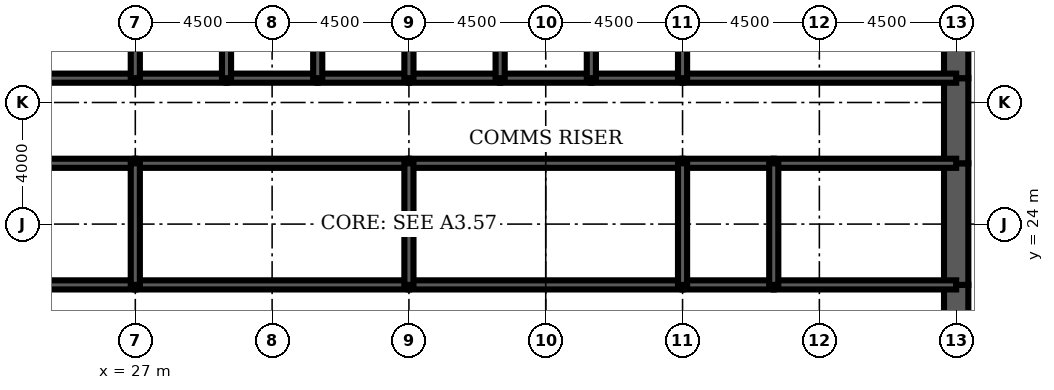
"""IFC4 building model, lengths in metres.
Left out: names, types, materials, properties, quantities, classifications, styles, units other than length and angle.
Written with IfcOpenShell. Run it as: python <this file> out.ifc"""

import sys

from ifc_helpers import new_model, si_unit, direction, frame, frame_2d, origin, place, context, subcontext, project, spatial, rectangle, extrude, element, fill, save


model = new_model("IFC4")
c1 = context("Model", 3, precision=1e-05, world=origin(), true_north=direction((0.0, 1.0)))
c2 = subcontext(c1, "Body", "Model", "MODEL_VIEW")
j1 = project(units=[si_unit("LENGTHUNIT", "METRE"), si_unit("PLANEANGLEUNIT", "RADIAN")], contexts=[c1])
p1 = place(None, origin())
s1 = spatial("IfcSite", under=j1, at=p1, CompositionType="ELEMENT")
p2 = place(p1, origin())
s2 = spatial("IfcBuilding", under=s1, at=p2, CompositionType="ELEMENT")
p3 = place(p2, frame((0.0, 0.0, 244.6)))
s3 = spatial("IfcBuildingStorey", under=s2, at=p3, CompositionType="ELEMENT", Elevation=244.6)
p4 = place(p3, frame((54.0, 19.2, 0.0), z_axis=(0.0, 0.0, 1.0), x_axis=(0.0, 1.0, 0.0)))
e1 = element("IfcWall", 1, at=p4, inside=s3, PredefinedType="SHEAR", context=c2, shape_type="SweptSolid", body=[
    extrude(rectangle(XDim=2.8, YDim=0.8, at=frame_2d((1.4, 0.0))), origin(), (0.0, 0.0, 1.0), 4.2),
])
p5 = place(p4, frame((0.4, 0.0, 0.0)))
e2 = element("IfcOpeningElement", 2, at=p5, cuts=e1, PredefinedType="OPENING", context=c2, shape_type="SweptSolid", body=[
    extrude(rectangle(XDim=1.8, YDim=2.1, at=frame_2d((0.9, 1.05))), frame((0.0, 0.41, 0.0), z_axis=(0.0, -1.0, 0.0), x_axis=(1.0, 0.0, 0.0)), (0.0, 0.0, 1.0), 0.82),
])
p6 = place(p3, frame((54.0, 22.0, 0.0), z_axis=(0.0, 0.0, 1.0), x_axis=(0.0, 1.0, 0.0)))
e3 = element("IfcWall", 3, at=p6, inside=s3, PredefinedType="SHEAR", context=c2, shape_type="SweptSolid", body=[
    extrude(rectangle(XDim=4.0, YDim=0.8, at=frame_2d((2.0, 0.0))), origin(), (0.0, 0.0, 1.0), 4.2),
])
p7 = place(p3, frame((54.0, 26.0, 0.0), z_axis=(0.0, 0.0, 1.0), x_axis=(0.0, 1.0, 0.0)))
e4 = element("IfcWall", 4, at=p7, inside=s3, PredefinedType="SHEAR", context=c2, shape_type="SweptSolid", body=[
    extrude(rectangle(XDim=2.8, YDim=0.8, at=frame_2d((1.4, 0.0))), origin(), (0.0, 0.0, 1.0), 4.2),
])
p8 = place(p7, frame((0.6, 0.0, 0.0)))
e5 = element("IfcOpeningElement", 5, at=p8, cuts=e4, PredefinedType="OPENING", context=c2, shape_type="SweptSolid", body=[
    extrude(rectangle(XDim=1.8, YDim=2.1, at=frame_2d((0.9, 1.05))), frame((0.0, 0.41, 0.0), z_axis=(0.0, -1.0, 0.0), x_axis=(1.0, 0.0, 0.0)), (0.0, 0.0, 1.0), 0.82),
])
p9 = place(p3, frame((54.0, 28.8, 0.0), z_axis=(0.0, 0.0, 1.0), x_axis=(0.0, 1.0, 0.0)))
e6 = element("IfcWall", 6, at=p9, inside=s3, PredefinedType="SHEAR", context=c2, shape_type="SweptSolid", body=[
    extrude(rectangle(XDim=3.2, YDim=0.8, at=frame_2d((1.6, 0.0))), origin(), (0.0, 0.0, 1.0), 4.2),
])
p10 = place(p3, frame((18.0, 28.8, 0.0), z_axis=(0.0, 0.0, 1.0), x_axis=(1.0, 0.0, 0.0)))
e7 = element("IfcWall", 7, at=p10, inside=s3, PredefinedType="SOLIDWALL", context=c2, shape_type="SweptSolid", body=[
    extrude(rectangle(XDim=9.0, YDim=0.3, at=frame_2d((4.5, 0.0))), origin(), (0.0, 0.0, 1.0), 4.2),
])
p11 = place(p10, frame((0.65, 0.0, 0.0)))
e8 = element("IfcOpeningElement", 8, at=p11, cuts=e7, PredefinedType="OPENING", context=c2, shape_type="SweptSolid", body=[
    extrude(rectangle(XDim=1.0, YDim=2.1, at=frame_2d((0.5, 1.05))), frame((0.0, 0.16, 0.0), z_axis=(0.0, -1.0, 0.0), x_axis=(1.0, 0.0, 0.0)), (0.0, 0.0, 1.0), 0.32),
])
p12 = place(p3, frame((27.0, 28.8, 0.0), z_axis=(0.0, 0.0, 1.0), x_axis=(1.0, 0.0, 0.0)))
e9 = element("IfcWall", 9, at=p12, inside=s3, PredefinedType="SOLIDWALL", context=c2, shape_type="SweptSolid", body=[
    extrude(rectangle(XDim=3.0, YDim=0.3, at=frame_2d((1.5, 0.0))), origin(), (0.0, 0.0, 1.0), 4.2),
])
p13 = place(p12, frame((0.95, 0.0, 0.0)))
e10 = element("IfcOpeningElement", 10, at=p13, cuts=e9, PredefinedType="OPENING", context=c2, shape_type="SweptSolid", body=[
    extrude(rectangle(XDim=1.1, YDim=2.2, at=frame_2d((0.55, 1.1))), frame((0.0, 0.16, 0.0), z_axis=(0.0, -1.0, 0.0), x_axis=(1.0, 0.0, 0.0)), (0.0, 0.0, 1.0), 0.32),
])
p14 = place(p3, frame((30.0, 28.8, 0.0), z_axis=(0.0, 0.0, 1.0), x_axis=(1.0, 0.0, 0.0)))
e11 = element("IfcWall", 11, at=p14, inside=s3, PredefinedType="SOLIDWALL", context=c2, shape_type="SweptSolid", body=[
    extrude(rectangle(XDim=3.0, YDim=0.3, at=frame_2d((1.5, 0.0))), origin(), (0.0, 0.0, 1.0), 4.2),
])
p15 = place(p14, frame((0.95, 0.0, 0.0)))
e12 = element("IfcOpeningElement", 12, at=p15, cuts=e11, PredefinedType="OPENING", context=c2, shape_type="SweptSolid", body=[
    extrude(rectangle(XDim=1.1, YDim=2.2, at=frame_2d((0.55, 1.1))), frame((0.0, 0.16, 0.0), z_axis=(0.0, -1.0, 0.0), x_axis=(1.0, 0.0, 0.0)), (0.0, 0.0, 1.0), 0.32),
])
p16 = place(p3, frame((33.0, 28.8, 0.0), z_axis=(0.0, 0.0, 1.0), x_axis=(1.0, 0.0, 0.0)))
e13 = element("IfcWall", 13, at=p16, inside=s3, PredefinedType="SOLIDWALL", context=c2, shape_type="SweptSolid", body=[
    extrude(rectangle(XDim=3.0, YDim=0.3, at=frame_2d((1.5, 0.0))), origin(), (0.0, 0.0, 1.0), 4.2),
])
p17 = place(p16, frame((0.95, 0.0, 0.0)))
e14 = element("IfcOpeningElement", 14, at=p17, cuts=e13, PredefinedType="OPENING", context=c2, shape_type="SweptSolid", body=[
    extrude(rectangle(XDim=1.1, YDim=2.2, at=frame_2d((0.55, 1.1))), frame((0.0, 0.16, 0.0), z_axis=(0.0, -1.0, 0.0), x_axis=(1.0, 0.0, 0.0)), (0.0, 0.0, 1.0), 0.32),
])
for number, where, z_axis, x_axis in (
    (15, (36.0, 28.8, 0.0), (0.0, 0.0, 1.0), (1.0, 0.0, 0.0)),
    (16, (39.0, 28.8, 0.0), (0.0, 0.0, 1.0), (1.0, 0.0, 0.0)),
):
    element("IfcWall", number, at=place(p3, frame(where, z_axis=z_axis, x_axis=x_axis)), inside=s3, PredefinedType="SOLIDWALL", context=c2, shape_type="SweptSolid", body=[
        extrude(rectangle(XDim=3.0, YDim=0.3, at=frame_2d((1.5, 0.0))), origin(), (0.0, 0.0, 1.0), 4.2),
    ])
p18 = place(p3, frame((42.0, 28.8, 0.0), z_axis=(0.0, 0.0, 1.0), x_axis=(1.0, 0.0, 0.0)))
e17 = element("IfcWall", 17, at=p18, inside=s3, PredefinedType="SOLIDWALL", context=c2, shape_type="SweptSolid", body=[
    extrude(rectangle(XDim=3.0, YDim=0.3, at=frame_2d((1.5, 0.0))), origin(), (0.0, 0.0, 1.0), 4.2),
])
p19 = place(p18, frame((0.95, 0.0, 0.0)))
e18 = element("IfcOpeningElement", 18, at=p19, cuts=e17, PredefinedType="OPENING", context=c2, shape_type="SweptSolid", body=[
    extrude(rectangle(XDim=1.1, YDim=2.2, at=frame_2d((0.55, 1.1))), frame((0.0, 0.16, 0.0), z_axis=(0.0, -1.0, 0.0), x_axis=(1.0, 0.0, 0.0)), (0.0, 0.0, 1.0), 0.32),
])
p20 = place(p3, frame((45.0, 28.8, 0.0), z_axis=(0.0, 0.0, 1.0), x_axis=(1.0, 0.0, 0.0)))
e19 = element("IfcWall", 19, at=p20, inside=s3, PredefinedType="SOLIDWALL", context=c2, shape_type="SweptSolid", body=[
    extrude(rectangle(XDim=9.0, YDim=0.3, at=frame_2d((4.5, 0.0))), origin(), (0.0, 0.0, 1.0), 4.2),
])
p21 = place(p20, frame((7.35, 0.0, 0.0)))
e20 = element("IfcOpeningElement", 20, at=p21, cuts=e19, PredefinedType="OPENING", context=c2, shape_type="SweptSolid", body=[
    extrude(rectangle(XDim=1.0, YDim=2.1, at=frame_2d((0.5, 1.05))), frame((0.0, 0.16, 0.0), z_axis=(0.0, -1.0, 0.0), x_axis=(1.0, 0.0, 0.0)), (0.0, 0.0, 1.0), 0.32),
])
p22 = place(p3, frame((24.0, 22.0, 0.0), z_axis=(0.0, 0.0, 1.0), x_axis=(1.0, 0.0, 0.0)))
e21 = element("IfcWall", 21, at=p22, inside=s3, PredefinedType="SOLIDWALL", context=c2, shape_type="SweptSolid", body=[
    extrude(rectangle(XDim=3.0, YDim=0.3, at=frame_2d((1.5, 0.0))), origin(), (0.0, 0.0, 1.0), 4.2),
])
p23 = place(p22, frame((1.0, 0.0, 0.0)))
e22 = element("IfcOpeningElement", 22, at=p23, cuts=e21, PredefinedType="OPENING", context=c2, shape_type="SweptSolid", body=[
    extrude(rectangle(XDim=1.0, YDim=2.1, at=frame_2d((0.5, 1.05))), frame((0.0, 0.16, 0.0), z_axis=(0.0, -1.0, 0.0), x_axis=(1.0, 0.0, 0.0)), (0.0, 0.0, 1.0), 0.32),
])
p24 = place(p3, frame((27.0, 22.0, 0.0), z_axis=(0.0, 0.0, 1.0), x_axis=(1.0, 0.0, 0.0)))
e23 = element("IfcWall", 23, at=p24, inside=s3, PredefinedType="SOLIDWALL", context=c2, shape_type="SweptSolid", body=[
    extrude(rectangle(XDim=9.0, YDim=0.3, at=frame_2d((4.5, 0.0))), origin(), (0.0, 0.0, 1.0), 4.2),
])
p25 = place(p24, frame((4.0, 0.0, 0.0)))
e24 = element("IfcOpeningElement", 24, at=p25, cuts=e23, PredefinedType="OPENING", context=c2, shape_type="SweptSolid", body=[
    extrude(rectangle(XDim=1.0, YDim=2.1, at=frame_2d((0.5, 1.05))), frame((0.0, 0.16, 0.0), z_axis=(0.0, -1.0, 0.0), x_axis=(1.0, 0.0, 0.0)), (0.0, 0.0, 1.0), 0.32),
])
p26 = place(p3, frame((36.0, 22.0, 0.0), z_axis=(0.0, 0.0, 1.0), x_axis=(1.0, 0.0, 0.0)))
e25 = element("IfcWall", 25, at=p26, inside=s3, PredefinedType="SOLIDWALL", context=c2, shape_type="SweptSolid", body=[
    extrude(rectangle(XDim=9.0, YDim=0.3, at=frame_2d((4.5, 0.0))), origin(), (0.0, 0.0, 1.0), 4.2),
])
p27 = place(p26, frame((4.0, 0.0, 0.0)))
e26 = element("IfcOpeningElement", 26, at=p27, cuts=e25, PredefinedType="OPENING", context=c2, shape_type="SweptSolid", body=[
    extrude(rectangle(XDim=1.0, YDim=2.1, at=frame_2d((0.5, 1.05))), frame((0.0, 0.16, 0.0), z_axis=(0.0, -1.0, 0.0), x_axis=(1.0, 0.0, 0.0)), (0.0, 0.0, 1.0), 0.32),
])
p28 = place(p3, frame((45.0, 22.0, 0.0), z_axis=(0.0, 0.0, 1.0), x_axis=(1.0, 0.0, 0.0)))
e27 = element("IfcWall", 27, at=p28, inside=s3, PredefinedType="SOLIDWALL", context=c2, shape_type="SweptSolid", body=[
    extrude(rectangle(XDim=3.0, YDim=0.3, at=frame_2d((1.5, 0.0))), origin(), (0.0, 0.0, 1.0), 4.2),
])
p29 = place(p28, frame((1.0, 0.0, 0.0)))
e28 = element("IfcOpeningElement", 28, at=p29, cuts=e27, PredefinedType="OPENING", context=c2, shape_type="SweptSolid", body=[
    extrude(rectangle(XDim=1.0, YDim=2.1, at=frame_2d((0.5, 1.05))), frame((0.0, 0.16, 0.0), z_axis=(0.0, -1.0, 0.0), x_axis=(1.0, 0.0, 0.0)), (0.0, 0.0, 1.0), 0.32),
])
p30 = place(p3, frame((48.0, 22.0, 0.0), z_axis=(0.0, 0.0, 1.0), x_axis=(1.0, 0.0, 0.0)))
e29 = element("IfcWall", 29, at=p30, inside=s3, PredefinedType="SOLIDWALL", context=c2, shape_type="SweptSolid", body=[
    extrude(rectangle(XDim=6.0, YDim=0.3, at=frame_2d((3.0, 0.0))), origin(), (0.0, 0.0, 1.0), 4.2),
])
p31 = place(p30, frame((2.0, 0.0, 0.0)))
e30 = element("IfcOpeningElement", 30, at=p31, cuts=e29, PredefinedType="OPENING", context=c2, shape_type="SweptSolid", body=[
    extrude(rectangle(XDim=1.0, YDim=2.1, at=frame_2d((0.5, 1.05))), frame((0.0, 0.16, 0.0), z_axis=(0.0, -1.0, 0.0), x_axis=(1.0, 0.0, 0.0)), (0.0, 0.0, 1.0), 0.32),
])
p32 = place(p30, frame((4.35, 0.0, 0.0)))
e31 = element("IfcOpeningElement", 31, at=p32, cuts=e29, PredefinedType="OPENING", context=c2, shape_type="SweptSolid", body=[
    extrude(rectangle(XDim=1.0, YDim=2.1, at=frame_2d((0.5, 1.05))), frame((0.0, 0.16, 0.0), z_axis=(0.0, -1.0, 0.0), x_axis=(1.0, 0.0, 0.0)), (0.0, 0.0, 1.0), 0.32),
])
p33 = place(p3, frame((24.0, 26.0, 0.0), z_axis=(0.0, 0.0, 1.0), x_axis=(1.0, 0.0, 0.0)))
e32 = element("IfcWall", 32, at=p33, inside=s3, PredefinedType="SOLIDWALL", context=c2, shape_type="SweptSolid", body=[
    extrude(rectangle(XDim=3.0, YDim=0.3, at=frame_2d((1.5, 0.0))), origin(), (0.0, 0.0, 1.0), 4.2),
])
for number, where, z_axis, x_axis in (
    (33, (27.0, 26.0, 0.0), (0.0, 0.0, 1.0), (1.0, 0.0, 0.0)),
    (34, (36.0, 26.0, 0.0), (0.0, 0.0, 1.0), (1.0, 0.0, 0.0)),
):
    element("IfcWall", number, at=place(p3, frame(where, z_axis=z_axis, x_axis=x_axis)), inside=s3, PredefinedType="SOLIDWALL", context=c2, shape_type="SweptSolid", body=[
        extrude(rectangle(XDim=9.0, YDim=0.3, at=frame_2d((4.5, 0.0))), origin(), (0.0, 0.0, 1.0), 4.2),
    ])
p34 = place(p3, frame((45.0, 26.0, 0.0), z_axis=(0.0, 0.0, 1.0), x_axis=(1.0, 0.0, 0.0)))
e35 = element("IfcWall", 35, at=p34, inside=s3, PredefinedType="SOLIDWALL", context=c2, shape_type="SweptSolid", body=[
    extrude(rectangle(XDim=3.0, YDim=0.3, at=frame_2d((1.5, 0.0))), origin(), (0.0, 0.0, 1.0), 4.2),
])
p35 = place(p3, frame((48.0, 26.0, 0.0), z_axis=(0.0, 0.0, 1.0), x_axis=(1.0, 0.0, 0.0)))
e36 = element("IfcWall", 36, at=p35, inside=s3, PredefinedType="SOLIDWALL", context=c2, shape_type="SweptSolid", body=[
    extrude(rectangle(XDim=6.0, YDim=0.3, at=frame_2d((3.0, 0.0))), origin(), (0.0, 0.0, 1.0), 4.2),
])
for number, where, z_axis, x_axis in (
    (37, (27.0, 28.8, 0.0), (0.0, 0.0, 1.0), (0.0, 1.0, 0.0)),
    (38, (30.0, 28.8, 0.0), (0.0, 0.0, 1.0), (0.0, 1.0, 0.0)),
    (39, (33.0, 28.8, 0.0), (0.0, 0.0, 1.0), (0.0, 1.0, 0.0)),
    (40, (36.0, 28.8, 0.0), (0.0, 0.0, 1.0), (0.0, 1.0, 0.0)),
    (41, (39.0, 28.8, 0.0), (0.0, 0.0, 1.0), (0.0, 1.0, 0.0)),
    (42, (42.0, 28.8, 0.0), (0.0, 0.0, 1.0), (0.0, 1.0, 0.0)),
    (43, (45.0, 28.8, 0.0), (0.0, 0.0, 1.0), (0.0, 1.0, 0.0)),
):
    element("IfcWall", number, at=place(p3, frame(where, z_axis=z_axis, x_axis=x_axis)), inside=s3, PredefinedType="SOLIDWALL", context=c2, shape_type="SweptSolid", body=[
        extrude(rectangle(XDim=3.2, YDim=0.3, at=frame_2d((1.6, 0.0))), origin(), (0.0, 0.0, 1.0), 4.2),
    ])
for number, where, z_axis, x_axis in (
    (44, (27.0, 22.0, 0.0), (0.0, 0.0, 1.0), (0.0, 1.0, 0.0)),
    (45, (36.0, 22.0, 0.0), (0.0, 0.0, 1.0), (0.0, 1.0, 0.0)),
    (46, (45.0, 22.0, 0.0), (0.0, 0.0, 1.0), (0.0, 1.0, 0.0)),
    (47, (48.0, 22.0, 0.0), (0.0, 0.0, 1.0), (0.0, 1.0, 0.0)),
):
    element("IfcWall", number, at=place(p3, frame(where, z_axis=z_axis, x_axis=x_axis)), inside=s3, PredefinedType="SOLIDWALL", context=c2, shape_type="SweptSolid", body=[
        extrude(rectangle(XDim=4.0, YDim=0.3, at=frame_2d((2.0, 0.0))), origin(), (0.0, 0.0, 1.0), 4.2),
    ])
p36 = place(p3, frame((38.5, 22.15, 0.0), z_axis=(0.0, 0.0, 1.0), x_axis=(0.0, 1.0, 0.0)))
e48 = element("IfcWall", 48, at=p36, inside=s3, PredefinedType="PARTITIONING", context=c2, shape_type="SweptSolid", body=[
    extrude(rectangle(XDim=3.7, YDim=0.15, at=frame_2d((1.85, 0.0))), origin(), (0.0, 0.0, 1.0), 3.0),
])
p37 = place(p36, frame((2.2, 0.0, 0.0)))
e49 = element("IfcOpeningElement", 49, at=p37, cuts=e48, PredefinedType="OPENING", context=c2, shape_type="SweptSolid", body=[
    extrude(rectangle(XDim=1.0, YDim=2.1, at=frame_2d((0.5, 1.05))), frame((0.0, 0.085, 0.0), z_axis=(0.0, -1.0, 0.0), x_axis=(1.0, 0.0, 0.0)), (0.0, 0.0, 1.0), 0.17),
])
p38 = place(p3, frame((52.025, 22.15, 0.0), z_axis=(0.0, 0.0, 1.0), x_axis=(0.0, 1.0, 0.0)))
e50 = element("IfcWall", 50, at=p38, inside=s3, PredefinedType="PARTITIONING", context=c2, shape_type="SweptSolid", body=[
    extrude(rectangle(XDim=3.7, YDim=0.15, at=frame_2d((1.85, 0.0))), origin(), (0.0, 0.0, 1.0), 3.0),
])
p39 = place(p3, frame((25.2, 26.15, 0.0), z_axis=(0.0, 0.0, 1.0), x_axis=(0.0, 1.0, 0.0)))
e51 = element("IfcWall", 51, at=p39, inside=s3, PredefinedType="PARTITIONING", context=c2, shape_type="SweptSolid", body=[
    extrude(rectangle(XDim=2.5, YDim=0.15, at=frame_2d((1.25, 0.0))), origin(), (0.0, 0.0, 1.0), 3.0),
])
p40 = place(p39, frame((0.35, 0.0, 0.0)))
e52 = element("IfcOpeningElement", 52, at=p40, cuts=e51, PredefinedType="OPENING", context=c2, shape_type="SweptSolid", body=[
    extrude(rectangle(XDim=1.0, YDim=2.1, at=frame_2d((0.5, 1.05))), frame((0.0, 0.085, 0.0), z_axis=(0.0, -1.0, 0.0), x_axis=(1.0, 0.0, 0.0)), (0.0, 0.0, 1.0), 0.17),
])
p41 = place(p37, origin())
e53 = element("IfcDoor", 53, at=p41, inside=s3, OperationType="SINGLE_SWING_RIGHT", PredefinedType="DOOR", context=c2, shape_type="SweptSolid", body=[
    extrude(rectangle(XDim=1.0, YDim=2.1, at=frame_2d((0.5, 1.05))), frame((0.0, 0.025, 0.0), z_axis=(0.0, -1.0, 0.0), x_axis=(1.0, 0.0, 0.0)), (0.0, 0.0, 1.0), 0.05),
])
fill(e49, e53)
p42 = place(p40, origin())
e54 = element("IfcDoor", 54, at=p42, inside=s3, OperationType="SINGLE_SWING_LEFT", PredefinedType="DOOR", context=c2, shape_type="SweptSolid", body=[
    extrude(rectangle(XDim=1.0, YDim=2.1, at=frame_2d((0.5, 1.05))), frame((0.0, 0.025, 0.0), z_axis=(0.0, -1.0, 0.0), x_axis=(1.0, 0.0, 0.0)), (0.0, 0.0, 1.0), 0.05),
])
fill(e52, e54)
p43 = place(p19, origin())
e55 = element("IfcDoor", 55, at=p43, inside=s3, OperationType="DOUBLE_DOOR_SLIDING", PredefinedType="USERDEFINED", context=c2, shape_type="SweptSolid", body=[
    extrude(rectangle(XDim=1.1, YDim=2.2, at=frame_2d((0.55, 1.1))), frame((0.0, 0.025, 0.0), z_axis=(0.0, -1.0, 0.0), x_axis=(1.0, 0.0, 0.0)), (0.0, 0.0, 1.0), 0.05),
])
fill(e18, e55)
p44 = place(p13, origin())
e56 = element("IfcDoor", 56, at=p44, inside=s3, OperationType="DOUBLE_DOOR_SLIDING", PredefinedType="USERDEFINED", context=c2, shape_type="SweptSolid", body=[
    extrude(rectangle(XDim=1.1, YDim=2.2, at=frame_2d((0.55, 1.1))), frame((0.0, 0.025, 0.0), z_axis=(0.0, -1.0, 0.0), x_axis=(1.0, 0.0, 0.0)), (0.0, 0.0, 1.0), 0.05),
])
fill(e10, e56)
p45 = place(p15, origin())
e57 = element("IfcDoor", 57, at=p45, inside=s3, OperationType="DOUBLE_DOOR_SLIDING", PredefinedType="USERDEFINED", context=c2, shape_type="SweptSolid", body=[
    extrude(rectangle(XDim=1.1, YDim=2.2, at=frame_2d((0.55, 1.1))), frame((0.0, 0.025, 0.0), z_axis=(0.0, -1.0, 0.0), x_axis=(1.0, 0.0, 0.0)), (0.0, 0.0, 1.0), 0.05),
])
fill(e12, e57)
p46 = place(p17, origin())
e58 = element("IfcDoor", 58, at=p46, inside=s3, OperationType="DOUBLE_DOOR_SLIDING", PredefinedType="USERDEFINED", context=c2, shape_type="SweptSolid", body=[
    extrude(rectangle(XDim=1.1, YDim=2.2, at=frame_2d((0.55, 1.1))), frame((0.0, 0.025, 0.0), z_axis=(0.0, -1.0, 0.0), x_axis=(1.0, 0.0, 0.0)), (0.0, 0.0, 1.0), 0.05),
])
fill(e14, e58)
p47 = place(p21, origin())
e59 = element("IfcDoor", 59, at=p47, inside=s3, OperationType="SINGLE_SWING_RIGHT", PredefinedType="DOOR", context=c2, shape_type="SweptSolid", body=[
    extrude(rectangle(XDim=1.0, YDim=2.1, at=frame_2d((0.5, 1.05))), frame((0.0, 0.025, 0.0), z_axis=(0.0, -1.0, 0.0), x_axis=(1.0, 0.0, 0.0)), (0.0, 0.0, 1.0), 0.05),
])
fill(e20, e59)
p48 = place(p5, origin())
e60 = element("IfcDoor", 60, at=p48, inside=s3, OperationType="SINGLE_SWING_LEFT", PredefinedType="DOOR", context=c2, shape_type="SweptSolid", body=[
    extrude(rectangle(XDim=1.8, YDim=2.1, at=frame_2d((0.9, 1.05))), frame((0.0, 0.4, 0.0), z_axis=(0.0, -1.0, 0.0), x_axis=(1.0, 0.0, 0.0)), (0.0, 0.0, 1.0), 0.8),
])
fill(e2, e60)
p49 = place(p8, origin())
e61 = element("IfcDoor", 61, at=p49, inside=s3, OperationType="SINGLE_SWING_LEFT", PredefinedType="DOOR", context=c2, shape_type="SweptSolid", body=[
    extrude(rectangle(XDim=1.8, YDim=2.1, at=frame_2d((0.9, 1.05))), frame((0.0, 0.4, 0.0), z_axis=(0.0, -1.0, 0.0), x_axis=(1.0, 0.0, 0.0)), (0.0, 0.0, 1.0), 0.8),
])
fill(e5, e61)
p50 = place(p23, origin())
e62 = element("IfcDoor", 62, at=p50, inside=s3, OperationType="SINGLE_SWING_LEFT", PredefinedType="DOOR", context=c2, shape_type="SweptSolid", body=[
    extrude(rectangle(XDim=1.0, YDim=2.1, at=frame_2d((0.5, 1.05))), frame((0.0, 0.025, 0.0), z_axis=(0.0, -1.0, 0.0), x_axis=(1.0, 0.0, 0.0)), (0.0, 0.0, 1.0), 0.05),
])
fill(e22, e62)
p51 = place(p25, origin())
e63 = element("IfcDoor", 63, at=p51, inside=s3, OperationType="SINGLE_SWING_LEFT", PredefinedType="DOOR", context=c2, shape_type="SweptSolid", body=[
    extrude(rectangle(XDim=1.0, YDim=2.1, at=frame_2d((0.5, 1.05))), frame((0.0, 0.025, 0.0), z_axis=(0.0, -1.0, 0.0), x_axis=(1.0, 0.0, 0.0)), (0.0, 0.0, 1.0), 0.05),
])
fill(e24, e63)
p52 = place(p27, origin())
e64 = element("IfcDoor", 64, at=p52, inside=s3, OperationType="SINGLE_SWING_LEFT", PredefinedType="DOOR", context=c2, shape_type="SweptSolid", body=[
    extrude(rectangle(XDim=1.0, YDim=2.1, at=frame_2d((0.5, 1.05))), frame((0.0, 0.025, 0.0), z_axis=(0.0, -1.0, 0.0), x_axis=(1.0, 0.0, 0.0)), (0.0, 0.0, 1.0), 0.05),
])
fill(e26, e64)
p53 = place(p29, origin())
e65 = element("IfcDoor", 65, at=p53, inside=s3, OperationType="SINGLE_SWING_LEFT", PredefinedType="DOOR", context=c2, shape_type="SweptSolid", body=[
    extrude(rectangle(XDim=1.0, YDim=2.1, at=frame_2d((0.5, 1.05))), frame((0.0, 0.025, 0.0), z_axis=(0.0, -1.0, 0.0), x_axis=(1.0, 0.0, 0.0)), (0.0, 0.0, 1.0), 0.05),
])
fill(e28, e65)
p54 = place(p31, origin())
e66 = element("IfcDoor", 66, at=p54, inside=s3, OperationType="SINGLE_SWING_LEFT", PredefinedType="DOOR", context=c2, shape_type="SweptSolid", body=[
    extrude(rectangle(XDim=1.0, YDim=2.1, at=frame_2d((0.5, 1.05))), frame((0.0, 0.025, 0.0), z_axis=(0.0, -1.0, 0.0), x_axis=(1.0, 0.0, 0.0)), (0.0, 0.0, 1.0), 0.05),
])
fill(e30, e66)
p55 = place(p32, origin())
e67 = element("IfcDoor", 67, at=p55, inside=s3, OperationType="SINGLE_SWING_RIGHT", PredefinedType="DOOR", context=c2, shape_type="SweptSolid", body=[
    extrude(rectangle(XDim=1.0, YDim=2.1, at=frame_2d((0.5, 1.05))), frame((0.0, 0.025, 0.0), z_axis=(0.0, -1.0, 0.0), x_axis=(1.0, 0.0, 0.0)), (0.0, 0.0, 1.0), 0.05),
])
fill(e31, e67)
save(model, sys.argv[1])
